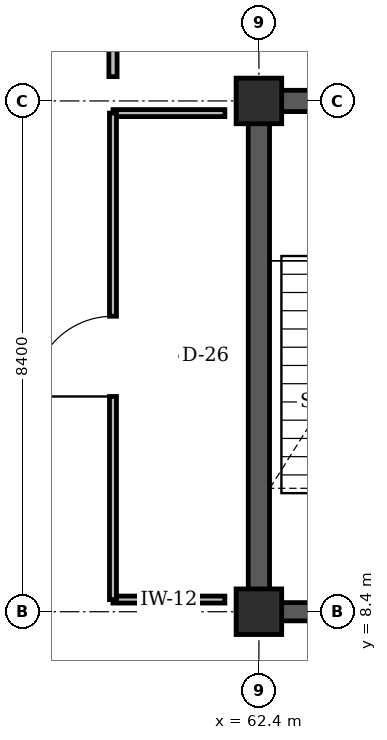
"""IFC4 building model, lengths in metres.
Left out: names, types, materials, properties, quantities, classifications, styles, units other than length and angle.
Written with IfcOpenShell. Run it as: python <this file> out.ifc"""

import sys

from ifc_helpers import new_model, si_unit, direction, frame, frame_2d, origin, origin_2d, place, context, subcontext, project, spatial, rectangle, extrude, element, fill, save


model = new_model("IFC4")
c1 = context("Model", 3, precision=1e-05, world=origin(), true_north=direction((0.0, 1.0)))
c2 = subcontext(c1, "Body", "Model", "MODEL_VIEW")
j1 = project(units=[si_unit("LENGTHUNIT", "METRE"), si_unit("PLANEANGLEUNIT", "RADIAN")], contexts=[c1])
p1 = place(None, origin())
s1 = spatial("IfcSite", under=j1, at=p1, CompositionType="ELEMENT")
p2 = place(p1, origin())
s2 = spatial("IfcBuilding", under=s1, at=p2, CompositionType="ELEMENT")
p3 = place(p2, frame((0.0, 0.0, 4.8)))
s3 = spatial("IfcBuildingStorey", under=s2, at=p3, CompositionType="ELEMENT", Elevation=4.8)
p4 = place(p3, frame((62.225, 16.8, 0.0), z_axis=(0.0, 0.0, 1.0), x_axis=(1.0, 0.0, 0.0)))
e1 = element("IfcWall", 1, at=p4, inside=s3, PredefinedType="SHEAR", context=c2, shape_type="SweptSolid", body=[
    extrude(rectangle(XDim=8.15, YDim=0.35, at=frame_2d((4.075, 0.0))), origin(), (0.0, 0.0, 1.0), 4.48),
])
p5 = place(p3, frame((62.4, 8.4, 0.0), z_axis=(0.0, 0.0, 1.0), x_axis=(0.0, 1.0, 0.0)))
e2 = element("IfcWall", 2, at=p5, inside=s3, PredefinedType="SHEAR", context=c2, shape_type="SweptSolid", body=[
    extrude(rectangle(XDim=8.4, YDim=0.35, at=frame_2d((4.2, 0.0))), origin(), (0.0, 0.0, 1.0), 4.48),
])
for number, where, z_axis, x_axis in (
    (3, (62.4, 8.4, 0.0), (0.0, 0.0, 1.0), (1.0, 0.0, 0.0)),
    (4, (62.4, 16.8, 0.0), (0.0, 0.0, 1.0), (1.0, 0.0, 0.0)),
):
    element("IfcColumn", number, at=place(p3, frame(where, z_axis=z_axis, x_axis=x_axis)), inside=s3, PredefinedType="COLUMN", context=c2, shape_type="SweptSolid", body=[
        extrude(rectangle(XDim=0.75, YDim=0.75, at=origin_2d()), origin(), (0.0, 0.0, 1.0), 4.8),
    ])
p6 = place(p3, frame((62.4, 8.4, 0.0), z_axis=(0.0, 0.0, 1.0), x_axis=(1.0, 0.0, 0.0)))
e5 = element("IfcWall", 5, at=p6, inside=s3, PredefinedType="SHEAR", context=c2, shape_type="SweptSolid", body=[
    extrude(rectangle(XDim=4.15, YDim=0.3, at=frame_2d((2.075, 0.0))), origin(), (0.0, 0.0, 1.0), 4.8),
])
p7 = place(p6, frame((1.515, 0.0, 0.0)))
e6 = element("IfcOpeningElement", 6, at=p7, cuts=e5, PredefinedType="OPENING", context=c2, shape_type="SweptSolid", body=[
    extrude(rectangle(XDim=1.12, YDim=2.15, at=frame_2d((0.56, 1.075))), frame((0.0, 0.16, 0.0), z_axis=(0.0, -1.0, 0.0), x_axis=(1.0, 0.0, 0.0)), (0.0, 0.0, 1.0), 0.32),
])
for number, where, z_axis, x_axis in (
    (7, (60.0, 8.6, 0.0), (0.0, 0.0, 1.0), (1.0, 0.0, 0.0)),
    (8, (60.0, 16.6, 0.0), (0.0, 0.0, 1.0), (1.0, 0.0, 0.0)),
):
    element("IfcWall", number, at=place(p3, frame(where, z_axis=z_axis, x_axis=x_axis)), inside=s3, PredefinedType="PARTITIONING", context=c2, shape_type="SweptSolid", body=[
        extrude(rectangle(XDim=1.84, YDim=0.115, at=frame_2d((0.92, 0.0))), origin(), (0.0, 0.0, 1.0), 3.68),
    ])
p8 = place(p3, frame((60.0, 8.6, 0.0), z_axis=(0.0, 0.0, 1.0), x_axis=(0.0, 1.0, 0.0)))
e9 = element("IfcWall", 9, at=p8, inside=s3, PredefinedType="PARTITIONING", context=c2, shape_type="SweptSolid", body=[
    extrude(rectangle(XDim=8.0, YDim=0.115, at=frame_2d((4.0, 0.0))), origin(), (0.0, 0.0, 1.0), 4.46),
])
p9 = place(p8, frame((3.34, 0.0, 0.0)))
e10 = element("IfcOpeningElement", 10, at=p9, cuts=e9, PredefinedType="OPENING", context=c2, shape_type="SweptSolid", body=[
    extrude(rectangle(XDim=1.32, YDim=2.15, at=frame_2d((0.66, 1.075))), frame((0.0, 0.067, 0.0), z_axis=(0.0, -1.0, 0.0), x_axis=(1.0, 0.0, 0.0)), (0.0, 0.0, 1.0), 0.135),
])
p10 = place(p3, frame((60.0, 17.2, 0.0), z_axis=(0.0, 0.0, 1.0), x_axis=(0.0, 1.0, 0.0)))
e11 = element("IfcWall", 11, at=p10, inside=s3, PredefinedType="PARTITIONING", context=c2, shape_type="SweptSolid", body=[
    extrude(rectangle(XDim=7.6, YDim=0.135, at=frame_2d((3.8, 0.0))), origin(), (0.0, 0.0, 1.0), 4.46),
])
p11 = place(p10, frame((3.2, 0.0, 0.0)))
e12 = element("IfcOpeningElement", 12, at=p11, cuts=e11, PredefinedType="OPENING", context=c2, shape_type="SweptSolid", body=[
    extrude(rectangle(XDim=1.2, YDim=2.15, at=frame_2d((0.6, 1.075))), frame((0.0, 0.078, 0.0), z_axis=(0.0, -1.0, 0.0), x_axis=(1.0, 0.0, 0.0)), (0.0, 0.0, 1.0), 0.155),
])
p12 = place(p9, origin())
e13 = element("IfcDoor", 13, at=p12, inside=s3, OperationType="SINGLE_SWING_LEFT", PredefinedType="DOOR", context=c2, shape_type="SweptSolid", body=[
    extrude(rectangle(XDim=1.32, YDim=2.15, at=frame_2d((0.66, 1.075))), frame((0.0, 0.025, 0.0), z_axis=(0.0, -1.0, 0.0), x_axis=(1.0, 0.0, 0.0)), (0.0, 0.0, 1.0), 0.05),
])
fill(e10, e13)
save(model, sys.argv[1])
